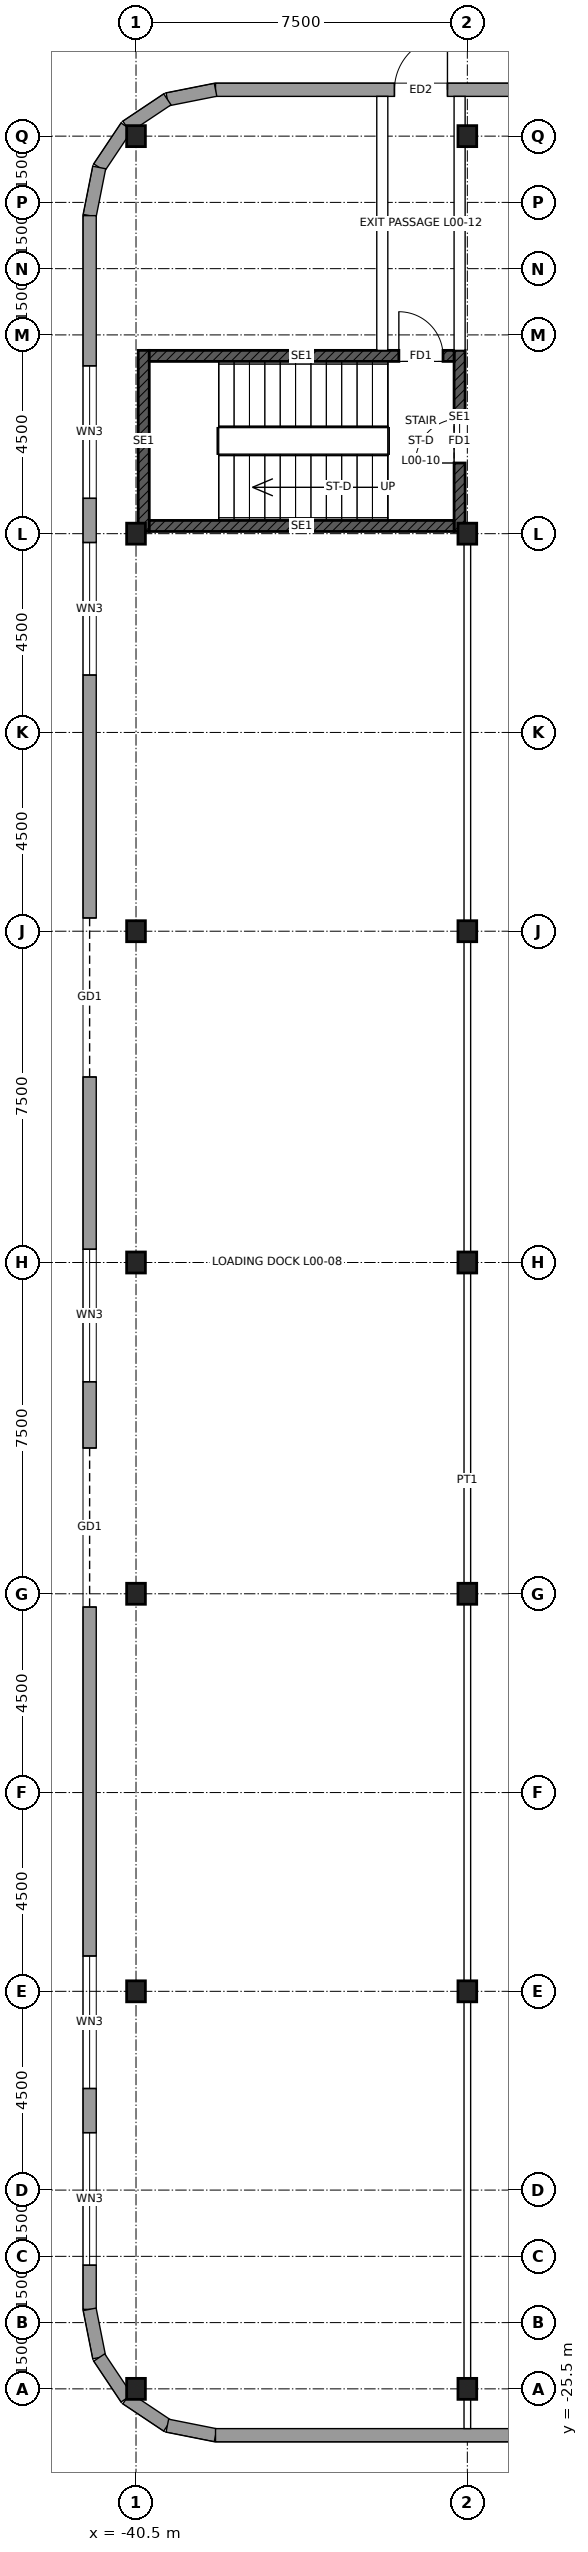
"""IFC4 building model, lengths in metres.
Left out: names, types, materials, properties, quantities, classifications, styles, units other than length and angle.
Written with IfcOpenShell. Run it as: python <this file> out.ifc"""

import sys

from ifc_helpers import new_model, si_unit, direction, frame, frame_2d, origin, origin_2d, place, context, subcontext, project, spatial, rectangle, i_section, extrude, element, fill, save


model = new_model("IFC4")
c1 = context("Model", 3, precision=1e-05, world=origin(), true_north=direction((0.0, 1.0)))
c2 = subcontext(c1, "Body", "Model", "MODEL_VIEW")
j1 = project(units=[si_unit("LENGTHUNIT", "METRE"), si_unit("PLANEANGLEUNIT", "RADIAN")], contexts=[c1])
p1 = place(None, origin())
s1 = spatial("IfcSite", under=j1, at=p1, CompositionType="ELEMENT")
p2 = place(p1, origin())
s2 = spatial("IfcBuilding", under=s1, at=p2, CompositionType="ELEMENT")
p3 = place(p2, origin())
s3 = spatial("IfcBuildingStorey", under=s2, at=p3, CompositionType="ELEMENT", Elevation=0.0)
for number, where, z_axis, x_axis in (
    (1, (-33.0, -25.5, -0.3), (0.0, 0.0, 1.0), (1.0, 0.0, 0.0)),
    (2, (-33.0, -16.5, -0.3), (0.0, 0.0, 1.0), (1.0, 0.0, 0.0)),
    (3, (-33.0, -7.5, -0.3), (0.0, 0.0, 1.0), (1.0, 0.0, 0.0)),
    (4, (-33.0, 0.0, -0.3), (0.0, 0.0, 1.0), (1.0, 0.0, 0.0)),
    (5, (-33.0, 7.5, -0.3), (0.0, 0.0, 1.0), (1.0, 0.0, 0.0)),
    (6, (-33.0, 16.5, -0.3), (0.0, 0.0, 1.0), (1.0, 0.0, 0.0)),
    (7, (-33.0, 25.5, -0.3), (0.0, 0.0, 1.0), (1.0, 0.0, 0.0)),
    (8, (-40.5, -25.5, -0.3), (0.0, 0.0, 1.0), (1.0, 0.0, 0.0)),
    (9, (-40.5, -16.5, -0.3), (0.0, 0.0, 1.0), (1.0, 0.0, 0.0)),
    (10, (-40.5, -7.5, -0.3), (0.0, 0.0, 1.0), (1.0, 0.0, 0.0)),
    (11, (-40.5, 0.0, -0.3), (0.0, 0.0, 1.0), (1.0, 0.0, 0.0)),
    (12, (-40.5, 7.5, -0.3), (0.0, 0.0, 1.0), (1.0, 0.0, 0.0)),
    (13, (-40.5, 16.5, -0.3), (0.0, 0.0, 1.0), (1.0, 0.0, 0.0)),
    (14, (-40.5, 25.5, -0.3), (0.0, 0.0, 1.0), (1.0, 0.0, 0.0)),
):
    element("IfcColumn", number, at=place(p3, frame(where, z_axis=z_axis, x_axis=x_axis)), inside=s3, PredefinedType="COLUMN", context=c2, shape_type="SweptSolid", body=[
        extrude(i_section(OverallWidth=0.424, OverallDepth=0.475, WebThickness=0.048, FlangeThickness=0.077, at=origin_2d()), origin(), (0.0, 0.0, 1.0), 7.5),
    ])
p4 = place(p3, frame((-26.9, 26.55, 0.0), z_axis=(0.0, 0.0, 1.0), x_axis=(-1.0, 0.0, 0.0)))
e15 = element("IfcWall", 15, at=p4, inside=s3, PredefinedType="SOLIDWALL", context=c2, shape_type="SweptSolid", body=[
    extrude(rectangle(XDim=11.8, YDim=0.3, at=frame_2d((5.9, 0.0))), origin(), (0.0, 0.0, 1.0), 6.95),
])
p5 = place(p4, frame((6.55, 0.0, 0.0)))
e16 = element("IfcOpeningElement", 16, at=p5, cuts=e15, PredefinedType="OPENING", context=c2, shape_type="SweptSolid", body=[
    extrude(rectangle(XDim=1.2, YDim=2.4, at=frame_2d((0.6, 1.2))), frame((0.0, 0.16, 0.0), z_axis=(0.0, -1.0, 0.0), x_axis=(1.0, 0.0, 0.0)), (0.0, 0.0, 1.0), 0.32),
])
for number, where, z_axis, x_axis in (
    (17, (-38.7, 26.55, 0.0), (0.0, 0.0, 1.0), (-0.981, -0.195, 0.0)),
    (18, (-39.791, 26.333, 0.0), (0.0, 0.0, 1.0), (-0.832, -0.555, 0.0)),
    (19, (-40.715, 25.715, 0.0), (0.0, 0.0, 1.0), (-0.555, -0.832, 0.0)),
    (20, (-41.333, 24.791, 0.0), (0.0, 0.0, 1.0), (-0.195, -0.981, 0.0)),
):
    element("IfcWall", number, at=place(p3, frame(where, z_axis=z_axis, x_axis=x_axis)), inside=s3, PredefinedType="SOLIDWALL", context=c2, shape_type="SweptSolid", body=[
        extrude(rectangle(XDim=1.112, YDim=0.3, at=frame_2d((0.556, 0.0))), origin(), (0.0, 0.0, 1.0), 6.95),
    ])
p6 = place(p3, frame((-41.55, 23.7, 0.0), z_axis=(0.0, 0.0, 1.0), x_axis=(0.0, -1.0, 0.0)))
e21 = element("IfcWall", 21, at=p6, inside=s3, PredefinedType="SOLIDWALL", context=c2, shape_type="SweptSolid", body=[
    extrude(rectangle(XDim=47.4, YDim=0.3, at=frame_2d((23.7, 0.0))), origin(), (0.0, 0.0, 1.0), 6.95),
])
p7 = place(p6, frame((27.9, 0.0, 0.0)))
e22 = element("IfcOpeningElement", 22, at=p7, cuts=e21, PredefinedType="OPENING", context=c2, shape_type="SweptSolid", body=[
    extrude(rectangle(XDim=3.6, YDim=4.2, at=frame_2d((1.8, 2.1))), frame((0.0, 0.16, 0.0), z_axis=(0.0, -1.0, 0.0), x_axis=(1.0, 0.0, 0.0)), (0.0, 0.0, 1.0), 0.32),
])
p8 = place(p6, frame((15.9, 0.0, 0.0)))
e23 = element("IfcOpeningElement", 23, at=p8, cuts=e21, PredefinedType="OPENING", context=c2, shape_type="SweptSolid", body=[
    extrude(rectangle(XDim=3.6, YDim=4.2, at=frame_2d((1.8, 2.1))), frame((0.0, 0.16, 0.0), z_axis=(0.0, -1.0, 0.0), x_axis=(1.0, 0.0, 0.0)), (0.0, 0.0, 1.0), 0.32),
])
p9 = place(p6, frame((43.4, 0.0, 0.6)))
e24 = element("IfcOpeningElement", 24, at=p9, cuts=e21, PredefinedType="OPENING", context=c2, shape_type="SweptSolid", body=[
    extrude(rectangle(XDim=3.0, YDim=4.5, at=frame_2d((1.5, 2.25))), frame((0.0, 0.16, 0.0), z_axis=(0.0, -1.0, 0.0), x_axis=(1.0, 0.0, 0.0)), (0.0, 0.0, 1.0), 0.32),
])
p10 = place(p6, frame((39.4, 0.0, 0.6)))
e25 = element("IfcOpeningElement", 25, at=p10, cuts=e21, PredefinedType="OPENING", context=c2, shape_type="SweptSolid", body=[
    extrude(rectangle(XDim=3.0, YDim=4.5, at=frame_2d((1.5, 2.25))), frame((0.0, 0.16, 0.0), z_axis=(0.0, -1.0, 0.0), x_axis=(1.0, 0.0, 0.0)), (0.0, 0.0, 1.0), 0.32),
])
p11 = place(p6, frame((23.4, 0.0, 0.6)))
e26 = element("IfcOpeningElement", 26, at=p11, cuts=e21, PredefinedType="OPENING", context=c2, shape_type="SweptSolid", body=[
    extrude(rectangle(XDim=3.0, YDim=4.5, at=frame_2d((1.5, 2.25))), frame((0.0, 0.16, 0.0), z_axis=(0.0, -1.0, 0.0), x_axis=(1.0, 0.0, 0.0)), (0.0, 0.0, 1.0), 0.32),
])
p12 = place(p6, frame((7.4, 0.0, 0.6)))
e27 = element("IfcOpeningElement", 27, at=p12, cuts=e21, PredefinedType="OPENING", context=c2, shape_type="SweptSolid", body=[
    extrude(rectangle(XDim=3.0, YDim=4.5, at=frame_2d((1.5, 2.25))), frame((0.0, 0.16, 0.0), z_axis=(0.0, -1.0, 0.0), x_axis=(1.0, 0.0, 0.0)), (0.0, 0.0, 1.0), 0.32),
])
p13 = place(p6, frame((3.4, 0.0, 0.6)))
e28 = element("IfcOpeningElement", 28, at=p13, cuts=e21, PredefinedType="OPENING", context=c2, shape_type="SweptSolid", body=[
    extrude(rectangle(XDim=3.0, YDim=4.5, at=frame_2d((1.5, 2.25))), frame((0.0, 0.16, 0.0), z_axis=(0.0, -1.0, 0.0), x_axis=(1.0, 0.0, 0.0)), (0.0, 0.0, 1.0), 0.32),
])
for number, where, z_axis, x_axis in (
    (29, (-41.55, -23.7, 0.0), (0.0, 0.0, 1.0), (0.195, -0.981, 0.0)),
    (30, (-41.333, -24.791, 0.0), (0.0, 0.0, 1.0), (0.555, -0.832, 0.0)),
    (31, (-40.715, -25.715, 0.0), (0.0, 0.0, 1.0), (0.832, -0.555, 0.0)),
    (32, (-39.791, -26.333, 0.0), (0.0, 0.0, 1.0), (0.981, -0.195, 0.0)),
):
    element("IfcWall", number, at=place(p3, frame(where, z_axis=z_axis, x_axis=x_axis)), inside=s3, PredefinedType="SOLIDWALL", context=c2, shape_type="SweptSolid", body=[
        extrude(rectangle(XDim=1.112, YDim=0.3, at=frame_2d((0.556, 0.0))), origin(), (0.0, 0.0, 1.0), 6.95),
    ])
p14 = place(p3, frame((-38.7, -26.55, 0.0), z_axis=(0.0, 0.0, 1.0), x_axis=(1.0, 0.0, 0.0)))
e33 = element("IfcWall", 33, at=p14, inside=s3, PredefinedType="SOLIDWALL", context=c2, shape_type="SweptSolid", body=[
    extrude(rectangle(XDim=11.8, YDim=0.3, at=frame_2d((5.9, 0.0))), origin(), (0.0, 0.0, 1.0), 6.95),
])
p15 = place(p3, frame((-33.0, -26.4, 0.0), z_axis=(0.0, 0.0, 1.0), x_axis=(0.0, 1.0, 0.0)))
e34 = element("IfcWall", 34, at=p15, inside=s3, PredefinedType="PARTITIONING", context=c2, shape_type="SweptSolid", body=[
    extrude(rectangle(XDim=42.95, YDim=0.15, at=frame_2d((21.475, 0.0))), origin(), (0.0, 0.0, 1.0), 6.165),
])
p16 = place(p3, frame((-40.325, 16.55, 0.0), z_axis=(0.0, 0.0, 1.0), x_axis=(0.0, 1.0, 0.0)))
e35 = element("IfcWall", 35, at=p16, inside=s3, PredefinedType="SOLIDWALL", context=c2, shape_type="SweptSolid", body=[
    extrude(rectangle(XDim=4.1, YDim=0.25, at=frame_2d((2.05, 0.0))), origin(), (0.0, 0.0, 1.0), 6.95),
])
p17 = place(p3, frame((-33.175, 16.55, 0.0), z_axis=(0.0, 0.0, 1.0), x_axis=(0.0, 1.0, 0.0)))
e36 = element("IfcWall", 36, at=p17, inside=s3, PredefinedType="SOLIDWALL", context=c2, shape_type="SweptSolid", body=[
    extrude(rectangle(XDim=4.1, YDim=0.25, at=frame_2d((2.05, 0.0))), origin(), (0.0, 0.0, 1.0), 6.95),
])
p18 = place(p17, frame((1.55, 0.0, 0.0)))
e37 = element("IfcOpeningElement", 37, at=p18, cuts=e36, PredefinedType="OPENING", context=c2, shape_type="SweptSolid", body=[
    extrude(rectangle(XDim=1.0, YDim=2.1, at=frame_2d((0.5, 1.05))), frame((0.0, 0.135, 0.0), z_axis=(0.0, -1.0, 0.0), x_axis=(1.0, 0.0, 0.0)), (0.0, 0.0, 1.0), 0.27),
])
p19 = place(p3, frame((-40.2, 16.675, 0.0), z_axis=(0.0, 0.0, 1.0), x_axis=(1.0, 0.0, 0.0)))
e38 = element("IfcWall", 38, at=p19, inside=s3, PredefinedType="SOLIDWALL", context=c2, shape_type="SweptSolid", body=[
    extrude(rectangle(XDim=6.9, YDim=0.25, at=frame_2d((3.45, 0.0))), origin(), (0.0, 0.0, 1.0), 6.95),
])
p20 = place(p3, frame((-40.2, 20.525, 0.0), z_axis=(0.0, 0.0, 1.0), x_axis=(1.0, 0.0, 0.0)))
e39 = element("IfcWall", 39, at=p20, inside=s3, PredefinedType="SOLIDWALL", context=c2, shape_type="SweptSolid", body=[
    extrude(rectangle(XDim=6.9, YDim=0.25, at=frame_2d((3.45, 0.0))), origin(), (0.0, 0.0, 1.0), 6.95),
])
p21 = place(p20, frame((5.65, 0.0, 0.0)))
e40 = element("IfcOpeningElement", 40, at=p21, cuts=e39, PredefinedType="OPENING", context=c2, shape_type="SweptSolid", body=[
    extrude(rectangle(XDim=1.0, YDim=2.1, at=frame_2d((0.5, 1.05))), frame((0.0, 0.135, 0.0), z_axis=(0.0, -1.0, 0.0), x_axis=(1.0, 0.0, 0.0)), (0.0, 0.0, 1.0), 0.27),
])
p22 = place(p3, frame((-34.925, 20.65, 0.0), z_axis=(0.0, 0.0, 1.0), x_axis=(0.0, 1.0, 0.0)))
e41 = element("IfcWall", 41, at=p22, inside=s3, PredefinedType="SOLIDWALL", context=c2, shape_type="SweptSolid", body=[
    extrude(rectangle(XDim=5.75, YDim=0.25, at=frame_2d((2.875, 0.0))), origin(), (0.0, 0.0, 1.0), 6.95),
])
p23 = place(p3, frame((-33.175, 20.65, 0.0), z_axis=(0.0, 0.0, 1.0), x_axis=(0.0, 1.0, 0.0)))
e42 = element("IfcWall", 42, at=p23, inside=s3, PredefinedType="SOLIDWALL", context=c2, shape_type="SweptSolid", body=[
    extrude(rectangle(XDim=5.75, YDim=0.25, at=frame_2d((2.875, 0.0))), origin(), (0.0, 0.0, 1.0), 6.165),
])
p24 = place(p5, frame((1.2, 0.0, 0.0), z_axis=(0.0, 0.0, 1.0), x_axis=(-1.0, 0.0, 0.0)))
e43 = element("IfcDoor", 43, at=p24, inside=s3, OperationType="SINGLE_SWING_RIGHT", PredefinedType="DOOR", context=c2, shape_type="SweptSolid", body=[
    extrude(rectangle(XDim=1.2, YDim=2.4, at=frame_2d((0.6, 1.2))), frame((0.0, 0.025, 0.0), z_axis=(0.0, -1.0, 0.0), x_axis=(1.0, 0.0, 0.0)), (0.0, 0.0, 1.0), 0.05),
])
fill(e16, e43)
p25 = place(p7, origin())
e44 = element("IfcDoor", 44, at=p25, inside=s3, OperationType="ROLLINGUP", PredefinedType="DOOR", context=c2, shape_type="SweptSolid", body=[
    extrude(rectangle(XDim=3.6, YDim=4.2, at=frame_2d((1.8, 2.1))), frame((0.0, 0.025, 0.0), z_axis=(0.0, -1.0, 0.0), x_axis=(1.0, 0.0, 0.0)), (0.0, 0.0, 1.0), 0.05),
])
fill(e22, e44)
p26 = place(p8, origin())
e45 = element("IfcDoor", 45, at=p26, inside=s3, OperationType="ROLLINGUP", PredefinedType="DOOR", context=c2, shape_type="SweptSolid", body=[
    extrude(rectangle(XDim=3.6, YDim=4.2, at=frame_2d((1.8, 2.1))), frame((0.0, 0.025, 0.0), z_axis=(0.0, -1.0, 0.0), x_axis=(1.0, 0.0, 0.0)), (0.0, 0.0, 1.0), 0.05),
])
fill(e23, e45)
p27 = place(p9, origin())
e46 = element("IfcWindow", 46, at=p27, inside=s3, PartitioningType="SINGLE_PANEL", PredefinedType="WINDOW", context=c2, shape_type="SweptSolid", body=[
    extrude(rectangle(XDim=3.0, YDim=4.5, at=frame_2d((1.5, 2.25))), frame((0.0, 0.03, 0.0), z_axis=(0.0, -1.0, 0.0), x_axis=(1.0, 0.0, 0.0)), (0.0, 0.0, 1.0), 0.06),
])
fill(e24, e46)
p28 = place(p10, origin())
e47 = element("IfcWindow", 47, at=p28, inside=s3, PartitioningType="SINGLE_PANEL", PredefinedType="WINDOW", context=c2, shape_type="SweptSolid", body=[
    extrude(rectangle(XDim=3.0, YDim=4.5, at=frame_2d((1.5, 2.25))), frame((0.0, 0.03, 0.0), z_axis=(0.0, -1.0, 0.0), x_axis=(1.0, 0.0, 0.0)), (0.0, 0.0, 1.0), 0.06),
])
fill(e25, e47)
p29 = place(p11, origin())
e48 = element("IfcWindow", 48, at=p29, inside=s3, PartitioningType="SINGLE_PANEL", PredefinedType="WINDOW", context=c2, shape_type="SweptSolid", body=[
    extrude(rectangle(XDim=3.0, YDim=4.5, at=frame_2d((1.5, 2.25))), frame((0.0, 0.03, 0.0), z_axis=(0.0, -1.0, 0.0), x_axis=(1.0, 0.0, 0.0)), (0.0, 0.0, 1.0), 0.06),
])
fill(e26, e48)
p30 = place(p12, origin())
e49 = element("IfcWindow", 49, at=p30, inside=s3, PartitioningType="SINGLE_PANEL", PredefinedType="WINDOW", context=c2, shape_type="SweptSolid", body=[
    extrude(rectangle(XDim=3.0, YDim=4.5, at=frame_2d((1.5, 2.25))), frame((0.0, 0.03, 0.0), z_axis=(0.0, -1.0, 0.0), x_axis=(1.0, 0.0, 0.0)), (0.0, 0.0, 1.0), 0.06),
])
fill(e27, e49)
p31 = place(p13, origin())
e50 = element("IfcWindow", 50, at=p31, inside=s3, PartitioningType="SINGLE_PANEL", PredefinedType="WINDOW", context=c2, shape_type="SweptSolid", body=[
    extrude(rectangle(XDim=3.0, YDim=4.5, at=frame_2d((1.5, 2.25))), frame((0.0, 0.03, 0.0), z_axis=(0.0, -1.0, 0.0), x_axis=(1.0, 0.0, 0.0)), (0.0, 0.0, 1.0), 0.06),
])
fill(e28, e50)
p32 = place(p18, origin())
e51 = element("IfcDoor", 51, at=p32, inside=s3, OperationType="SINGLE_SWING_LEFT", PredefinedType="DOOR", context=c2, shape_type="SweptSolid", body=[
    extrude(rectangle(XDim=1.0, YDim=2.1, at=frame_2d((0.5, 1.05))), frame((0.0, 0.025, 0.0), z_axis=(0.0, -1.0, 0.0), x_axis=(1.0, 0.0, 0.0)), (0.0, 0.0, 1.0), 0.05),
])
fill(e37, e51)
p33 = place(p21, origin())
e52 = element("IfcDoor", 52, at=p33, inside=s3, OperationType="SINGLE_SWING_LEFT", PredefinedType="DOOR", context=c2, shape_type="SweptSolid", body=[
    extrude(rectangle(XDim=1.0, YDim=2.1, at=frame_2d((0.5, 1.05))), frame((0.0, 0.025, 0.0), z_axis=(0.0, -1.0, 0.0), x_axis=(1.0, 0.0, 0.0)), (0.0, 0.0, 1.0), 0.05),
])
fill(e40, e52)
save(model, sys.argv[1])
